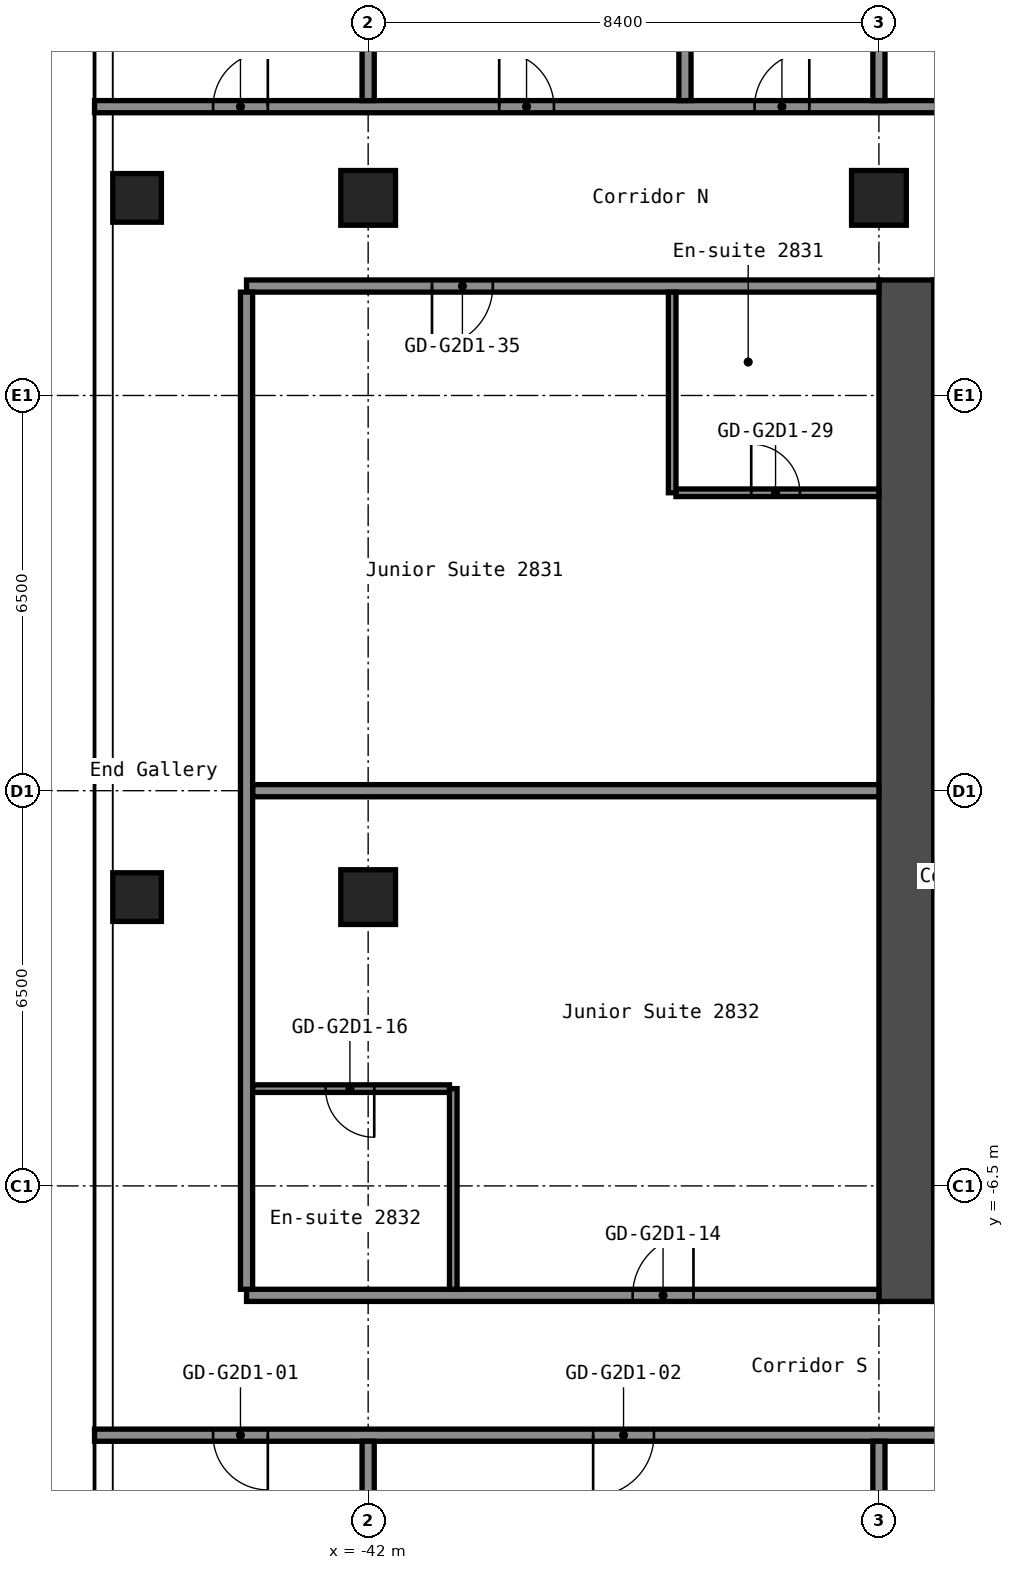
"""IFC4 building model, lengths in metres.
Left out: names, types, materials, properties, quantities, classifications, styles, units other than length and angle.
Written with IfcOpenShell. Run it as: python <this file> out.ifc"""

import sys

from ifc_helpers import new_model, si_unit, direction, frame, frame_2d, origin, origin_2d, place, context, subcontext, project, spatial, rectangle, hollow_rectangle, extrude, element, fill, save


model = new_model("IFC4")
c1 = context("Model", 3, precision=1e-05, world=origin(), true_north=direction((0.0, 1.0)))
c2 = subcontext(c1, "Body", "Model", "MODEL_VIEW")
j1 = project(units=[si_unit("LENGTHUNIT", "METRE"), si_unit("PLANEANGLEUNIT", "RADIAN")], contexts=[c1])
p1 = place(None, origin())
s1 = spatial("IfcSite", under=j1, at=p1, CompositionType="ELEMENT")
p2 = place(p1, origin())
s2 = spatial("IfcBuilding", under=s1, at=p2, CompositionType="ELEMENT")
p3 = place(p2, frame((0.0, 0.0, 101.0)))
s3 = spatial("IfcBuildingStorey", under=s2, at=p3, CompositionType="ELEMENT", Elevation=101.0)
for number, where, z_axis, x_axis in (
    (1, (-45.8, -1.75, 0.0), (0.0, 0.0, 1.0), (1.0, 0.0, 0.0)),
    (2, (-45.8, 9.75, 0.0), (0.0, 0.0, 1.0), (1.0, 0.0, 0.0)),
):
    element("IfcColumn", number, at=place(p3, frame(where, z_axis=z_axis, x_axis=x_axis)), inside=s3, PredefinedType="COLUMN", context=c2, shape_type="SweptSolid", body=[
        extrude(hollow_rectangle(XDim=0.8, YDim=0.8, WallThickness=0.032, at=origin_2d()), origin(), (0.0, 0.0, 1.0), 2.8),
    ])
for number, where, z_axis, x_axis in (
    (3, (-42.0, -1.75, 0.0), (0.0, 0.0, 1.0), (1.0, 0.0, 0.0)),
    (4, (-42.0, 9.75, 0.0), (0.0, 0.0, 1.0), (1.0, 0.0, 0.0)),
    (5, (-33.6, 9.75, 0.0), (0.0, 0.0, 1.0), (1.0, 0.0, 0.0)),
):
    element("IfcColumn", number, at=place(p3, frame(where, z_axis=z_axis, x_axis=x_axis)), inside=s3, PredefinedType="COLUMN", context=c2, shape_type="SweptSolid", body=[
        extrude(hollow_rectangle(XDim=0.9, YDim=0.9, WallThickness=0.036, at=origin_2d()), origin(), (0.0, 0.0, 1.0), 2.8),
    ])
p4 = place(p3, frame((-33.15, -8.4, 0.0), z_axis=(0.0, 0.0, 1.0), x_axis=(0.0, 1.0, 0.0)))
e6 = element("IfcWall", 6, at=p4, inside=s3, PredefinedType="SHEAR", context=c2, shape_type="SweptSolid", body=[
    extrude(rectangle(XDim=16.8, YDim=0.9, at=frame_2d((8.4, 0.0))), origin(), (0.0, 0.0, 1.0), 2.8),
])
p5 = place(p3, frame((-32.7, 1.325, 0.0), z_axis=(0.0, 0.0, 1.0), x_axis=(1.0, 0.0, 0.0)))
e7 = element("IfcWall", 7, at=p5, inside=s3, PredefinedType="SHEAR", context=c2, shape_type="SweptSolid", body=[
    extrude(rectangle(XDim=5.05, YDim=0.25, at=frame_2d((2.525, 0.0))), origin(), (0.0, 0.0, 1.0), 2.8),
])
p6 = place(p5, frame((3.3, 0.0, 0.0)))
e8 = element("IfcOpeningElement", 8, at=p6, cuts=e7, PredefinedType="OPENING", context=c2, shape_type="SweptSolid", body=[
    extrude(rectangle(XDim=1.2, YDim=2.1, at=frame_2d((0.6, 1.05))), frame((0.0, 0.135, 0.0), z_axis=(0.0, -1.0, 0.0), x_axis=(1.0, 0.0, 0.0)), (0.0, 0.0, 1.0), 0.27),
])
p7 = place(p3, frame((-32.7, -3.625, 0.0), z_axis=(0.0, 0.0, 1.0), x_axis=(1.0, 0.0, 0.0)))
e9 = element("IfcWall", 9, at=p7, inside=s3, PredefinedType="SHEAR", context=c2, shape_type="SweptSolid", body=[
    extrude(rectangle(XDim=4.55, YDim=0.25, at=frame_2d((2.275, 0.0))), origin(), (0.0, 0.0, 1.0), 2.8),
])
p8 = place(p7, frame((2.85, 0.0, 0.0)))
e10 = element("IfcOpeningElement", 10, at=p8, cuts=e9, PredefinedType="OPENING", context=c2, shape_type="SweptSolid", body=[
    extrude(rectangle(XDim=1.1, YDim=2.1, at=frame_2d((0.55, 1.05))), frame((0.0, 0.135, 0.0), z_axis=(0.0, -1.0, 0.0), x_axis=(1.0, 0.0, 0.0)), (0.0, 0.0, 1.0), 0.27),
])
p9 = place(p7, frame((0.6, 0.0, 0.0)))
e11 = element("IfcOpeningElement", 11, at=p9, cuts=e9, PredefinedType="OPENING", context=c2, shape_type="SweptSolid", body=[
    extrude(rectangle(XDim=1.1, YDim=2.1, at=frame_2d((0.55, 1.05))), frame((0.0, 0.135, 0.0), z_axis=(0.0, -1.0, 0.0), x_axis=(1.0, 0.0, 0.0)), (0.0, 0.0, 1.0), 0.27),
])
p10 = place(p3, frame((-32.7, -6.75, 0.0), z_axis=(0.0, 0.0, 1.0), x_axis=(1.0, 0.0, 0.0)))
e12 = element("IfcWall", 12, at=p10, inside=s3, PredefinedType="SHEAR", context=c2, shape_type="SweptSolid", body=[
    extrude(rectangle(XDim=4.55, YDim=1.5, at=frame_2d((2.275, 0.0))), origin(), (0.0, 0.0, 1.0), 2.8),
])
p11 = place(p3, frame((-46.5, -10.6, 0.0), z_axis=(0.0, 0.0, 1.0), x_axis=(1.0, 0.0, 0.0)))
e13 = element("IfcWall", 13, at=p11, inside=s3, PredefinedType="PARTITIONING", context=c2, shape_type="SweptSolid", body=[
    extrude(rectangle(XDim=29.7, YDim=0.2, at=frame_2d((14.85, 0.0))), origin(), (0.0, 0.0, 1.0), 2.8),
])
p12 = place(p11, frame((1.95, 0.0, 0.0)))
e14 = element("IfcOpeningElement", 14, at=p12, cuts=e13, PredefinedType="OPENING", context=c2, shape_type="SweptSolid", body=[
    extrude(rectangle(XDim=0.9, YDim=2.1, at=frame_2d((0.45, 1.05))), frame((0.0, 0.11, 0.0), z_axis=(0.0, -1.0, 0.0), x_axis=(1.0, 0.0, 0.0)), (0.0, 0.0, 1.0), 0.22),
])
p13 = place(p11, frame((8.2, 0.0, 0.0)))
e15 = element("IfcOpeningElement", 15, at=p13, cuts=e13, PredefinedType="OPENING", context=c2, shape_type="SweptSolid", body=[
    extrude(rectangle(XDim=1.0, YDim=2.1, at=frame_2d((0.5, 1.05))), frame((0.0, 0.11, 0.0), z_axis=(0.0, -1.0, 0.0), x_axis=(1.0, 0.0, 0.0)), (0.0, 0.0, 1.0), 0.22),
])
p14 = place(p11, frame((14.72, 0.0, 0.0)))
e16 = element("IfcOpeningElement", 16, at=p14, cuts=e13, PredefinedType="OPENING", context=c2, shape_type="SweptSolid", body=[
    extrude(rectangle(XDim=0.9, YDim=2.1, at=frame_2d((0.45, 1.05))), frame((0.0, 0.11, 0.0), z_axis=(0.0, -1.0, 0.0), x_axis=(1.0, 0.0, 0.0)), (0.0, 0.0, 1.0), 0.22),
])
p15 = place(p11, frame((18.92, 0.0, 0.0)))
e17 = element("IfcOpeningElement", 17, at=p15, cuts=e13, PredefinedType="OPENING", context=c2, shape_type="SweptSolid", body=[
    extrude(rectangle(XDim=0.9, YDim=2.1, at=frame_2d((0.45, 1.05))), frame((0.0, 0.11, 0.0), z_axis=(0.0, -1.0, 0.0), x_axis=(1.0, 0.0, 0.0)), (0.0, 0.0, 1.0), 0.22),
])
p16 = place(p11, frame((22.36, 0.0, 0.0)))
e18 = element("IfcOpeningElement", 18, at=p16, cuts=e13, PredefinedType="OPENING", context=c2, shape_type="SweptSolid", body=[
    extrude(rectangle(XDim=0.9, YDim=2.1, at=frame_2d((0.45, 1.05))), frame((0.0, 0.11, 0.0), z_axis=(0.0, -1.0, 0.0), x_axis=(1.0, 0.0, 0.0)), (0.0, 0.0, 1.0), 0.22),
])
p17 = place(p11, frame((26.56, 0.0, 0.0)))
e19 = element("IfcOpeningElement", 19, at=p17, cuts=e13, PredefinedType="OPENING", context=c2, shape_type="SweptSolid", body=[
    extrude(rectangle(XDim=0.9, YDim=2.1, at=frame_2d((0.45, 1.05))), frame((0.0, 0.11, 0.0), z_axis=(0.0, -1.0, 0.0), x_axis=(1.0, 0.0, 0.0)), (0.0, 0.0, 1.0), 0.22),
])
p18 = place(p3, frame((-44.0, -8.3, 0.0), z_axis=(0.0, 0.0, 1.0), x_axis=(1.0, 0.0, 0.0)))
e20 = element("IfcWall", 20, at=p18, inside=s3, PredefinedType="PARTITIONING", context=c2, shape_type="SweptSolid", body=[
    extrude(rectangle(XDim=10.4, YDim=0.2, at=frame_2d((5.2, 0.0))), origin(), (0.0, 0.0, 1.0), 2.8),
])
p19 = place(p18, frame((6.35, 0.0, 0.0)))
e21 = element("IfcOpeningElement", 21, at=p19, cuts=e20, PredefinedType="OPENING", context=c2, shape_type="SweptSolid", body=[
    extrude(rectangle(XDim=1.0, YDim=2.1, at=frame_2d((0.5, 1.05))), frame((0.0, 0.11, 0.0), z_axis=(0.0, -1.0, 0.0), x_axis=(1.0, 0.0, 0.0)), (0.0, 0.0, 1.0), 0.22),
])
p20 = place(p3, frame((-43.9, -4.9, 0.0), z_axis=(0.0, 0.0, 1.0), x_axis=(1.0, 0.0, 0.0)))
e22 = element("IfcWall", 22, at=p20, inside=s3, PredefinedType="PARTITIONING", context=c2, shape_type="SweptSolid", body=[
    extrude(rectangle(XDim=3.237, YDim=0.125, at=frame_2d((1.619, 0.0))), origin(), (0.0, 0.0, 1.0), 2.8),
])
p21 = place(p20, frame((1.2, 0.0, 0.0)))
e23 = element("IfcOpeningElement", 23, at=p21, cuts=e22, PredefinedType="OPENING", context=c2, shape_type="SweptSolid", body=[
    extrude(rectangle(XDim=0.8, YDim=2.1, at=frame_2d((0.4, 1.05))), frame((0.0, 0.073, 0.0), z_axis=(0.0, -1.0, 0.0), x_axis=(1.0, 0.0, 0.0)), (0.0, 0.0, 1.0), 0.145),
])
p22 = place(p3, frame((-43.9, 0.0, 0.0), z_axis=(0.0, 0.0, 1.0), x_axis=(1.0, 0.0, 0.0)))
e24 = element("IfcWall", 24, at=p22, inside=s3, PredefinedType="PARTITIONING", context=c2, shape_type="SweptSolid", body=[
    extrude(rectangle(XDim=10.3, YDim=0.2, at=frame_2d((5.15, 0.0))), origin(), (0.0, 0.0, 1.0), 2.8),
])
p23 = place(p3, frame((-36.938, 4.9, 0.0), z_axis=(0.0, 0.0, 1.0), x_axis=(1.0, 0.0, 0.0)))
e25 = element("IfcWall", 25, at=p23, inside=s3, PredefinedType="PARTITIONING", context=c2, shape_type="SweptSolid", body=[
    extrude(rectangle(XDim=3.337, YDim=0.125, at=frame_2d((1.669, 0.0))), origin(), (0.0, 0.0, 1.0), 2.8),
])
p24 = place(p23, frame((1.238, 0.0, 0.0)))
e26 = element("IfcOpeningElement", 26, at=p24, cuts=e25, PredefinedType="OPENING", context=c2, shape_type="SweptSolid", body=[
    extrude(rectangle(XDim=0.8, YDim=2.1, at=frame_2d((0.4, 1.05))), frame((0.0, 0.073, 0.0), z_axis=(0.0, -1.0, 0.0), x_axis=(1.0, 0.0, 0.0)), (0.0, 0.0, 1.0), 0.145),
])
p25 = place(p3, frame((-44.0, 8.3, 0.0), z_axis=(0.0, 0.0, 1.0), x_axis=(1.0, 0.0, 0.0)))
e27 = element("IfcWall", 27, at=p25, inside=s3, PredefinedType="PARTITIONING", context=c2, shape_type="SweptSolid", body=[
    extrude(rectangle(XDim=10.4, YDim=0.2, at=frame_2d((5.2, 0.0))), origin(), (0.0, 0.0, 1.0), 2.8),
])
p26 = place(p25, frame((3.05, 0.0, 0.0)))
e28 = element("IfcOpeningElement", 28, at=p26, cuts=e27, PredefinedType="OPENING", context=c2, shape_type="SweptSolid", body=[
    extrude(rectangle(XDim=1.0, YDim=2.1, at=frame_2d((0.5, 1.05))), frame((0.0, 0.11, 0.0), z_axis=(0.0, -1.0, 0.0), x_axis=(1.0, 0.0, 0.0)), (0.0, 0.0, 1.0), 0.22),
])
p27 = place(p3, frame((-46.5, 11.25, 0.0), z_axis=(0.0, 0.0, 1.0), x_axis=(1.0, 0.0, 0.0)))
e29 = element("IfcWall", 29, at=p27, inside=s3, PredefinedType="PARTITIONING", context=c2, shape_type="SweptSolid", body=[
    extrude(rectangle(XDim=29.7, YDim=0.2, at=frame_2d((14.85, 0.0))), origin(), (0.0, 0.0, 1.0), 2.8),
])
p28 = place(p27, frame((1.95, 0.0, 0.0)))
e30 = element("IfcOpeningElement", 30, at=p28, cuts=e29, PredefinedType="OPENING", context=c2, shape_type="SweptSolid", body=[
    extrude(rectangle(XDim=0.9, YDim=2.1, at=frame_2d((0.45, 1.05))), frame((0.0, 0.11, 0.0), z_axis=(0.0, -1.0, 0.0), x_axis=(1.0, 0.0, 0.0)), (0.0, 0.0, 1.0), 0.22),
])
p29 = place(p27, frame((6.655, 0.0, 0.0)))
e31 = element("IfcOpeningElement", 31, at=p29, cuts=e29, PredefinedType="OPENING", context=c2, shape_type="SweptSolid", body=[
    extrude(rectangle(XDim=0.9, YDim=2.1, at=frame_2d((0.45, 1.05))), frame((0.0, 0.11, 0.0), z_axis=(0.0, -1.0, 0.0), x_axis=(1.0, 0.0, 0.0)), (0.0, 0.0, 1.0), 0.22),
])
p30 = place(p27, frame((10.855, 0.0, 0.0)))
e32 = element("IfcOpeningElement", 32, at=p30, cuts=e29, PredefinedType="OPENING", context=c2, shape_type="SweptSolid", body=[
    extrude(rectangle(XDim=0.9, YDim=2.1, at=frame_2d((0.45, 1.05))), frame((0.0, 0.11, 0.0), z_axis=(0.0, -1.0, 0.0), x_axis=(1.0, 0.0, 0.0)), (0.0, 0.0, 1.0), 0.22),
])
p31 = place(p27, frame((14.13, 0.0, 0.0)))
e33 = element("IfcOpeningElement", 33, at=p31, cuts=e29, PredefinedType="OPENING", context=c2, shape_type="SweptSolid", body=[
    extrude(rectangle(XDim=0.9, YDim=2.1, at=frame_2d((0.45, 1.05))), frame((0.0, 0.11, 0.0), z_axis=(0.0, -1.0, 0.0), x_axis=(1.0, 0.0, 0.0)), (0.0, 0.0, 1.0), 0.22),
])
p32 = place(p27, frame((18.33, 0.0, 0.0)))
e34 = element("IfcOpeningElement", 34, at=p32, cuts=e29, PredefinedType="OPENING", context=c2, shape_type="SweptSolid", body=[
    extrude(rectangle(XDim=0.9, YDim=2.1, at=frame_2d((0.45, 1.05))), frame((0.0, 0.11, 0.0), z_axis=(0.0, -1.0, 0.0), x_axis=(1.0, 0.0, 0.0)), (0.0, 0.0, 1.0), 0.22),
])
p33 = place(p27, frame((22.78, 0.0, 0.0)))
e35 = element("IfcOpeningElement", 35, at=p33, cuts=e29, PredefinedType="OPENING", context=c2, shape_type="SweptSolid", body=[
    extrude(rectangle(XDim=0.9, YDim=2.1, at=frame_2d((0.45, 1.05))), frame((0.0, 0.11, 0.0), z_axis=(0.0, -1.0, 0.0), x_axis=(1.0, 0.0, 0.0)), (0.0, 0.0, 1.0), 0.22),
])
p34 = place(p27, frame((26.98, 0.0, 0.0)))
e36 = element("IfcOpeningElement", 36, at=p34, cuts=e29, PredefinedType="OPENING", context=c2, shape_type="SweptSolid", body=[
    extrude(rectangle(XDim=0.9, YDim=2.1, at=frame_2d((0.45, 1.05))), frame((0.0, 0.11, 0.0), z_axis=(0.0, -1.0, 0.0), x_axis=(1.0, 0.0, 0.0)), (0.0, 0.0, 1.0), 0.22),
])
p35 = place(p3, frame((-44.0, -8.2, 0.0), z_axis=(0.0, 0.0, 1.0), x_axis=(0.0, 1.0, 0.0)))
e37 = element("IfcWall", 37, at=p35, inside=s3, PredefinedType="PARTITIONING", context=c2, shape_type="SweptSolid", body=[
    extrude(rectangle(XDim=16.4, YDim=0.2, at=frame_2d((8.2, 0.0))), origin(), (0.0, 0.0, 1.0), 2.8),
])
p36 = place(p3, frame((-42.0, -15.55, 0.0), z_axis=(0.0, 0.0, 1.0), x_axis=(0.0, 1.0, 0.0)))
e38 = element("IfcWall", 38, at=p36, inside=s3, PredefinedType="PARTITIONING", context=c2, shape_type="SweptSolid", body=[
    extrude(rectangle(XDim=4.85, YDim=0.2, at=frame_2d((2.425, 0.0))), origin(), (0.0, 0.0, 1.0), 2.8),
])
p37 = place(p3, frame((-42.0, 11.35, 0.0), z_axis=(0.0, 0.0, 1.0), x_axis=(0.0, 1.0, 0.0)))
e39 = element("IfcWall", 39, at=p37, inside=s3, PredefinedType="PARTITIONING", context=c2, shape_type="SweptSolid", body=[
    extrude(rectangle(XDim=12.2, YDim=0.2, at=frame_2d((6.1, 0.0))), origin(), (0.0, 0.0, 1.0), 2.8),
])
for number, where, z_axis, x_axis in (
    (40, (-40.6, -8.2, 0.0), (0.0, 0.0, 1.0), (0.0, 1.0, 0.0)),
    (41, (-37.0, 4.9, 0.0), (0.0, 0.0, 1.0), (0.0, 1.0, 0.0)),
):
    element("IfcWall", number, at=place(p3, frame(where, z_axis=z_axis, x_axis=x_axis)), inside=s3, PredefinedType="PARTITIONING", context=c2, shape_type="SweptSolid", body=[
        extrude(rectangle(XDim=3.3, YDim=0.125, at=frame_2d((1.65, 0.0))), origin(), (0.0, 0.0, 1.0), 2.8),
    ])
p38 = place(p3, frame((-36.79, 11.35, 0.0), z_axis=(0.0, 0.0, 1.0), x_axis=(0.0, 1.0, 0.0)))
e42 = element("IfcWall", 42, at=p38, inside=s3, PredefinedType="PARTITIONING", context=c2, shape_type="SweptSolid", body=[
    extrude(rectangle(XDim=12.2, YDim=0.2, at=frame_2d((6.1, 0.0))), origin(), (0.0, 0.0, 1.0), 2.8),
])
p39 = place(p3, frame((-33.6, -15.55, 0.0), z_axis=(0.0, 0.0, 1.0), x_axis=(0.0, 1.0, 0.0)))
e43 = element("IfcWall", 43, at=p39, inside=s3, PredefinedType="PARTITIONING", context=c2, shape_type="SweptSolid", body=[
    extrude(rectangle(XDim=4.85, YDim=0.2, at=frame_2d((2.425, 0.0))), origin(), (0.0, 0.0, 1.0), 2.8),
])
p40 = place(p3, frame((-33.6, 11.35, 0.0), z_axis=(0.0, 0.0, 1.0), x_axis=(0.0, 1.0, 0.0)))
e44 = element("IfcWall", 44, at=p40, inside=s3, PredefinedType="PARTITIONING", context=c2, shape_type="SweptSolid", body=[
    extrude(rectangle(XDim=12.2, YDim=0.2, at=frame_2d((6.1, 0.0))), origin(), (0.0, 0.0, 1.0), 2.8),
])
p41 = place(p12, origin())
e45 = element("IfcDoor", 45, at=p41, inside=s3, OperationType="SINGLE_SWING_RIGHT", PredefinedType="DOOR", context=c2, shape_type="SweptSolid", body=[
    extrude(rectangle(XDim=0.9, YDim=2.1, at=frame_2d((0.45, 1.05))), frame((0.0, 0.025, 0.0), z_axis=(0.0, -1.0, 0.0), x_axis=(1.0, 0.0, 0.0)), (0.0, 0.0, 1.0), 0.05),
])
fill(e14, e45)
p42 = place(p13, origin())
e46 = element("IfcDoor", 46, at=p42, inside=s3, OperationType="SINGLE_SWING_LEFT", PredefinedType="DOOR", context=c2, shape_type="SweptSolid", body=[
    extrude(rectangle(XDim=1.0, YDim=2.1, at=frame_2d((0.5, 1.05))), frame((0.0, 0.025, 0.0), z_axis=(0.0, -1.0, 0.0), x_axis=(1.0, 0.0, 0.0)), (0.0, 0.0, 1.0), 0.05),
])
fill(e15, e46)
p43 = place(p19, origin())
e47 = element("IfcDoor", 47, at=p43, inside=s3, OperationType="SINGLE_SWING_LEFT", PredefinedType="DOOR", context=c2, shape_type="SweptSolid", body=[
    extrude(rectangle(XDim=1.0, YDim=2.1, at=frame_2d((0.5, 1.05))), frame((0.0, 0.025, 0.0), z_axis=(0.0, -1.0, 0.0), x_axis=(1.0, 0.0, 0.0)), (0.0, 0.0, 1.0), 0.05),
])
fill(e21, e47)
p44 = place(p21, origin())
e48 = element("IfcDoor", 48, at=p44, inside=s3, OperationType="SINGLE_SWING_RIGHT", PredefinedType="DOOR", context=c2, shape_type="SweptSolid", body=[
    extrude(rectangle(XDim=0.8, YDim=2.1, at=frame_2d((0.4, 1.05))), frame((0.0, 0.025, 0.0), z_axis=(0.0, -1.0, 0.0), x_axis=(1.0, 0.0, 0.0)), (0.0, 0.0, 1.0), 0.05),
])
fill(e23, e48)
p45 = place(p24, origin())
e49 = element("IfcDoor", 49, at=p45, inside=s3, OperationType="SINGLE_SWING_RIGHT", PredefinedType="DOOR", context=c2, shape_type="SweptSolid", body=[
    extrude(rectangle(XDim=0.8, YDim=2.1, at=frame_2d((0.4, 1.05))), frame((0.0, 0.025, 0.0), z_axis=(0.0, -1.0, 0.0), x_axis=(1.0, 0.0, 0.0)), (0.0, 0.0, 1.0), 0.05),
])
fill(e26, e49)
p46 = place(p26, origin())
e50 = element("IfcDoor", 50, at=p46, inside=s3, OperationType="SINGLE_SWING_LEFT", PredefinedType="DOOR", context=c2, shape_type="SweptSolid", body=[
    extrude(rectangle(XDim=1.0, YDim=2.1, at=frame_2d((0.5, 1.05))), frame((0.0, 0.025, 0.0), z_axis=(0.0, -1.0, 0.0), x_axis=(1.0, 0.0, 0.0)), (0.0, 0.0, 1.0), 0.05),
])
fill(e28, e50)
p47 = place(p28, origin())
e51 = element("IfcDoor", 51, at=p47, inside=s3, OperationType="SINGLE_SWING_LEFT", PredefinedType="DOOR", context=c2, shape_type="SweptSolid", body=[
    extrude(rectangle(XDim=0.9, YDim=2.1, at=frame_2d((0.45, 1.05))), frame((0.0, 0.025, 0.0), z_axis=(0.0, -1.0, 0.0), x_axis=(1.0, 0.0, 0.0)), (0.0, 0.0, 1.0), 0.05),
])
fill(e30, e51)
p48 = place(p29, origin())
e52 = element("IfcDoor", 52, at=p48, inside=s3, OperationType="SINGLE_SWING_RIGHT", PredefinedType="DOOR", context=c2, shape_type="SweptSolid", body=[
    extrude(rectangle(XDim=0.9, YDim=2.1, at=frame_2d((0.45, 1.05))), frame((0.0, 0.025, 0.0), z_axis=(0.0, -1.0, 0.0), x_axis=(1.0, 0.0, 0.0)), (0.0, 0.0, 1.0), 0.05),
])
fill(e31, e52)
p49 = place(p30, origin())
e53 = element("IfcDoor", 53, at=p49, inside=s3, OperationType="SINGLE_SWING_LEFT", PredefinedType="DOOR", context=c2, shape_type="SweptSolid", body=[
    extrude(rectangle(XDim=0.9, YDim=2.1, at=frame_2d((0.45, 1.05))), frame((0.0, 0.025, 0.0), z_axis=(0.0, -1.0, 0.0), x_axis=(1.0, 0.0, 0.0)), (0.0, 0.0, 1.0), 0.05),
])
fill(e32, e53)
save(model, sys.argv[1])
